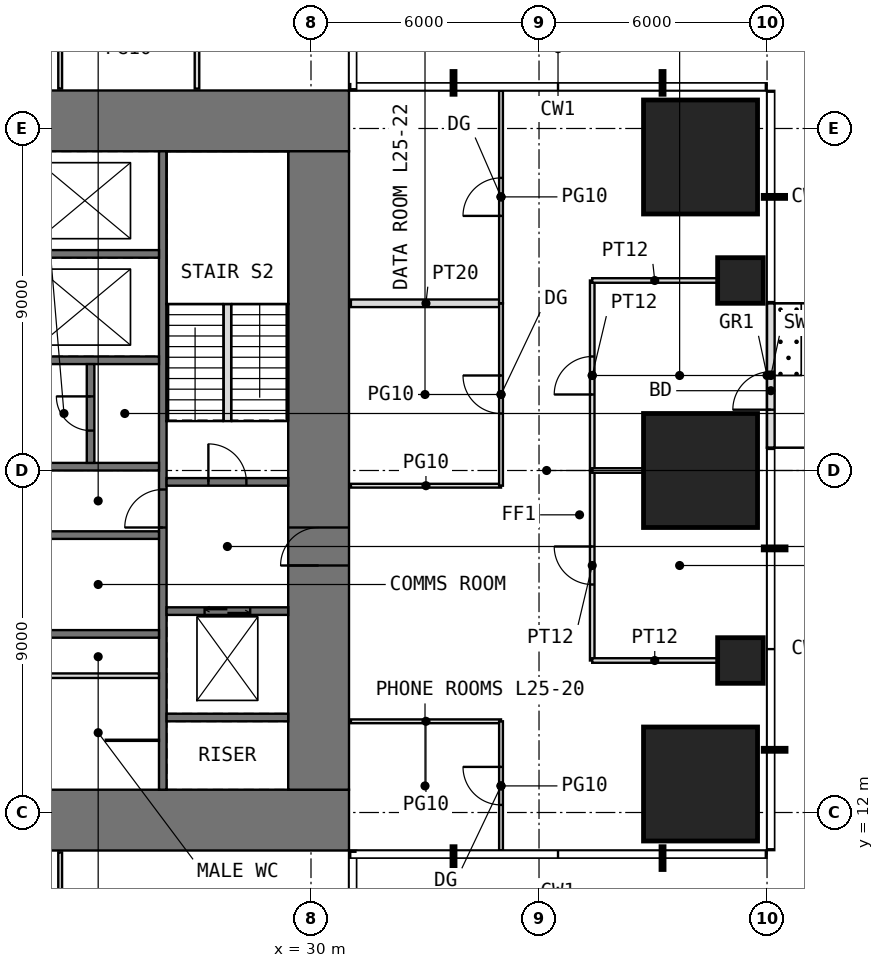
"""IFC4 building model, lengths in metres.
Left out: names, types, materials, properties, quantities, classifications, styles, units other than length and angle.
Written with IfcOpenShell. Run it as: python <this file> out.ifc"""

import sys

from ifc_helpers import new_model, si_unit, direction, frame, frame_2d, origin, origin_2d, place, context, subcontext, project, spatial, rectangle, extrude, element, fill, save


model = new_model("IFC4")
c1 = context("Model", 3, precision=1e-05, world=origin(), true_north=direction((0.0, 1.0)))
c2 = subcontext(c1, "Body", "Model", "MODEL_VIEW")
j1 = project(units=[si_unit("LENGTHUNIT", "METRE"), si_unit("PLANEANGLEUNIT", "RADIAN")], contexts=[c1])
p1 = place(None, origin())
s1 = spatial("IfcSite", under=j1, at=p1, CompositionType="ELEMENT")
p2 = place(p1, origin())
s2 = spatial("IfcBuilding", under=s1, at=p2, CompositionType="ELEMENT")
p3 = place(p2, frame((0.0, 0.0, 108.5)))
s3 = spatial("IfcBuildingStorey", under=s2, at=p3, CompositionType="ELEMENT", Elevation=108.5)
p4 = place(p3, frame((40.25, 12.75, 0.0), z_axis=(0.0, 0.0, 1.0), x_axis=(1.0, 0.0, 0.0)))
e1 = element("IfcColumn", 1, at=p4, inside=s3, PredefinedType="COLUMN", context=c2, shape_type="SweptSolid", body=[
    extrude(rectangle(XDim=3.0, YDim=3.0, at=origin_2d()), origin(), (0.0, 0.0, 1.0), 4.0),
])
p5 = place(p3, frame((41.3, 16.0, 0.0), z_axis=(0.0, 0.0, 1.0), x_axis=(1.0, 0.0, 0.0)))
e2 = element("IfcColumn", 2, at=p5, inside=s3, PredefinedType="COLUMN", context=c2, shape_type="SweptSolid", body=[
    extrude(rectangle(XDim=1.2, YDim=1.2, at=origin_2d()), origin(), (0.0, 0.0, 1.0), 4.0),
])
p6 = place(p3, frame((40.25, 21.0, 0.0), z_axis=(0.0, 0.0, 1.0), x_axis=(1.0, 0.0, 0.0)))
e3 = element("IfcColumn", 3, at=p6, inside=s3, PredefinedType="COLUMN", context=c2, shape_type="SweptSolid", body=[
    extrude(rectangle(XDim=3.0, YDim=3.0, at=origin_2d()), origin(), (0.0, 0.0, 1.0), 4.0),
])
p7 = place(p3, frame((41.3, 26.0, 0.0), z_axis=(0.0, 0.0, 1.0), x_axis=(1.0, 0.0, 0.0)))
e4 = element("IfcColumn", 4, at=p7, inside=s3, PredefinedType="COLUMN", context=c2, shape_type="SweptSolid", body=[
    extrude(rectangle(XDim=1.2, YDim=1.2, at=origin_2d()), origin(), (0.0, 0.0, 1.0), 4.0),
])
p8 = place(p3, frame((40.25, 29.25, 0.0), z_axis=(0.0, 0.0, 1.0), x_axis=(1.0, 0.0, 0.0)))
e5 = element("IfcColumn", 5, at=p8, inside=s3, PredefinedType="COLUMN", context=c2, shape_type="SweptSolid", body=[
    extrude(rectangle(XDim=3.0, YDim=3.0, at=origin_2d()), origin(), (0.0, 0.0, 1.0), 4.0),
])
p9 = place(p3, frame((42.1, 21.6, 0.0), z_axis=(0.0, 0.0, 1.0), x_axis=(0.0, 1.0, 0.0)))
e6 = element("IfcWall", 6, at=p9, inside=s3, PredefinedType="USERDEFINED", context=c2, shape_type="SweptSolid", body=[
    extrude(rectangle(XDim=3.8, YDim=0.2, at=frame_2d((1.9, 0.0))), origin(), (0.0, 0.0, 1.0), 3.75),
])
p10 = place(p9, frame((1.0, 0.0, 0.0)))
e7 = element("IfcOpeningElement", 7, at=p10, cuts=e6, PredefinedType="OPENING", context=c2, shape_type="SweptSolid", body=[
    extrude(rectangle(XDim=1.0, YDim=2.4, at=frame_2d((0.5, 1.2))), frame((0.0, 0.11, 0.0), z_axis=(0.0, -1.0, 0.0), x_axis=(1.0, 0.0, 0.0)), (0.0, 0.0, 1.0), 0.22),
])
p11 = place(p3, frame((11.0, 11.8, -0.05), z_axis=(0.0, 0.0, 1.0), x_axis=(1.0, 0.0, 0.0)))
e8 = element("IfcWall", 8, at=p11, inside=s3, PredefinedType="SHEAR", context=c2, shape_type="SweptSolid", body=[
    extrude(rectangle(XDim=20.0, YDim=1.6, at=frame_2d((10.0, 0.0))), origin(), (0.0, 0.0, 1.0), 4.0),
])
p12 = place(p11, frame((9.0, 0.0, 0.05)))
e9 = element("IfcOpeningElement", 9, at=p12, cuts=e8, PredefinedType="OPENING", context=c2, shape_type="SweptSolid", body=[
    extrude(rectangle(XDim=2.0, YDim=2.2, at=frame_2d((1.0, 1.1))), frame((0.0, 0.81, 0.0), z_axis=(0.0, -1.0, 0.0), x_axis=(1.0, 0.0, 0.0)), (0.0, 0.0, 1.0), 1.62),
])
p13 = place(p3, frame((11.0, 30.2, -0.05), z_axis=(0.0, 0.0, 1.0), x_axis=(1.0, 0.0, 0.0)))
e10 = element("IfcWall", 10, at=p13, inside=s3, PredefinedType="SHEAR", context=c2, shape_type="SweptSolid", body=[
    extrude(rectangle(XDim=20.0, YDim=1.6, at=frame_2d((10.0, 0.0))), origin(), (0.0, 0.0, 1.0), 4.0),
])
p14 = place(p13, frame((9.0, 0.0, 0.05)))
e11 = element("IfcOpeningElement", 11, at=p14, cuts=e10, PredefinedType="OPENING", context=c2, shape_type="SweptSolid", body=[
    extrude(rectangle(XDim=2.0, YDim=2.2, at=frame_2d((1.0, 1.1))), frame((0.0, 0.81, 0.0), z_axis=(0.0, -1.0, 0.0), x_axis=(1.0, 0.0, 0.0)), (0.0, 0.0, 1.0), 1.62),
])
p15 = place(p3, frame((30.2, 12.6, -0.05), z_axis=(0.0, 0.0, 1.0), x_axis=(0.0, 1.0, 0.0)))
e12 = element("IfcWall", 12, at=p15, inside=s3, PredefinedType="SHEAR", context=c2, shape_type="SweptSolid", body=[
    extrude(rectangle(XDim=16.8, YDim=1.6, at=frame_2d((8.4, 0.0))), origin(), (0.0, 0.0, 1.0), 4.0),
])
p16 = place(p15, frame((5.9, 0.0, 0.05)))
e13 = element("IfcOpeningElement", 13, at=p16, cuts=e12, PredefinedType="OPENING", context=c2, shape_type="SweptSolid", body=[
    extrude(rectangle(XDim=1.0, YDim=2.2, at=frame_2d((0.5, 1.1))), frame((0.0, 0.81, 0.0), z_axis=(0.0, -1.0, 0.0), x_axis=(1.0, 0.0, 0.0)), (0.0, 0.0, 1.0), 1.62),
])
p17 = place(p3, frame((26.1, 12.6, -0.05), z_axis=(0.0, 0.0, 1.0), x_axis=(0.0, 1.0, 0.0)))
e14 = element("IfcWall", 14, at=p17, inside=s3, PredefinedType="SHEAR", context=c2, shape_type="SweptSolid", body=[
    extrude(rectangle(XDim=16.8, YDim=0.2, at=frame_2d((8.4, 0.0))), origin(), (0.0, 0.0, 1.0), 4.0),
])
p18 = place(p17, frame((6.9, 0.0, 0.05)))
e15 = element("IfcOpeningElement", 15, at=p18, cuts=e14, PredefinedType="OPENING", context=c2, shape_type="SweptSolid", body=[
    extrude(rectangle(XDim=1.0, YDim=2.2, at=frame_2d((0.5, 1.1))), frame((0.0, 0.11, 0.0), z_axis=(0.0, -1.0, 0.0), x_axis=(1.0, 0.0, 0.0)), (0.0, 0.0, 1.0), 0.22),
])
for number, where, z_axis, x_axis in (
    (16, (22.8, 16.7, -0.05), (0.0, 0.0, 1.0), (1.0, 0.0, 0.0)),
    (17, (22.8, 19.3, -0.05), (0.0, 0.0, 1.0), (1.0, 0.0, 0.0)),
    (18, (22.8, 21.1, -0.05), (0.0, 0.0, 1.0), (1.0, 0.0, 0.0)),
    (19, (22.8, 23.9, -0.05), (0.0, 0.0, 1.0), (1.0, 0.0, 0.0)),
    (20, (22.8, 26.7, -0.05), (0.0, 0.0, 1.0), (1.0, 0.0, 0.0)),
    (21, (26.2, 14.5, -0.05), (0.0, 0.0, 1.0), (1.0, 0.0, 0.0)),
):
    element("IfcWall", number, at=place(p3, frame(where, z_axis=z_axis, x_axis=x_axis)), inside=s3, PredefinedType="SHEAR", context=c2, shape_type="SweptSolid", body=[
        extrude(rectangle(XDim=3.2, YDim=0.2, at=frame_2d((1.6, 0.0))), origin(), (0.0, 0.0, 1.0), 4.0),
    ])
p19 = place(p3, frame((26.2, 17.3, -0.05), z_axis=(0.0, 0.0, 1.0), x_axis=(1.0, 0.0, 0.0)))
e22 = element("IfcWall", 22, at=p19, inside=s3, PredefinedType="SHEAR", context=c2, shape_type="SweptSolid", body=[
    extrude(rectangle(XDim=3.2, YDim=0.2, at=frame_2d((1.6, 0.0))), origin(), (0.0, 0.0, 1.0), 4.0),
])
p20 = place(p19, frame((1.0, 0.0, 0.05)))
e23 = element("IfcOpeningElement", 23, at=p20, cuts=e22, PredefinedType="OPENING", context=c2, shape_type="SweptSolid", body=[
    extrude(rectangle(XDim=1.2, YDim=2.2, at=frame_2d((0.6, 1.1))), frame((0.0, 0.11, 0.0), z_axis=(0.0, -1.0, 0.0), x_axis=(1.0, 0.0, 0.0)), (0.0, 0.0, 1.0), 0.22),
])
p21 = place(p3, frame((26.2, 20.7, -0.05), z_axis=(0.0, 0.0, 1.0), x_axis=(1.0, 0.0, 0.0)))
e24 = element("IfcWall", 24, at=p21, inside=s3, PredefinedType="SHEAR", context=c2, shape_type="SweptSolid", body=[
    extrude(rectangle(XDim=3.2, YDim=0.2, at=frame_2d((1.6, 0.0))), origin(), (0.0, 0.0, 1.0), 4.0),
])
p22 = place(p21, frame((1.1, 0.0, 0.05)))
e25 = element("IfcOpeningElement", 25, at=p22, cuts=e24, PredefinedType="OPENING", context=c2, shape_type="SweptSolid", body=[
    extrude(rectangle(XDim=1.0, YDim=2.2, at=frame_2d((0.5, 1.1))), frame((0.0, 0.11, 0.0), z_axis=(0.0, -1.0, 0.0), x_axis=(1.0, 0.0, 0.0)), (0.0, 0.0, 1.0), 0.22),
])
p23 = place(p3, frame((22.8, 15.6, 0.0), z_axis=(0.0, 0.0, 1.0), x_axis=(1.0, 0.0, 0.0)))
e26 = element("IfcWall", 26, at=p23, inside=s3, PredefinedType="PARTITIONING", context=c2, shape_type="SweptSolid", body=[
    extrude(rectangle(XDim=3.2, YDim=0.12, at=frame_2d((1.6, 0.0))), origin(), (0.0, 0.0, 1.0), 3.75),
])
p24 = place(p3, frame((24.6, 13.9, 0.0), z_axis=(0.0, 0.0, 1.0), x_axis=(1.0, 0.0, 0.0)))
e27 = element("IfcWall", 27, at=p24, inside=s3, PredefinedType="PARTITIONING", context=c2, shape_type="SweptSolid", body=[
    extrude(rectangle(XDim=1.4, YDim=0.03, at=frame_2d((0.7, 0.0))), origin(), (0.0, 0.0, 1.0), 3.75),
])
p25 = place(p3, frame((24.2, 21.2, -0.05), z_axis=(0.0, 0.0, 1.0), x_axis=(0.0, 1.0, 0.0)))
e28 = element("IfcWall", 28, at=p25, inside=s3, PredefinedType="SHEAR", context=c2, shape_type="SweptSolid", body=[
    extrude(rectangle(XDim=2.6, YDim=0.2, at=frame_2d((1.3, 0.0))), origin(), (0.0, 0.0, 1.0), 4.0),
])
p26 = place(p25, frame((0.85, 0.0, 0.05)))
e29 = element("IfcOpeningElement", 29, at=p26, cuts=e28, PredefinedType="OPENING", context=c2, shape_type="SweptSolid", body=[
    extrude(rectangle(XDim=0.9, YDim=2.2, at=frame_2d((0.45, 1.1))), frame((0.0, 0.11, 0.0), z_axis=(0.0, -1.0, 0.0), x_axis=(1.0, 0.0, 0.0)), (0.0, 0.0, 1.0), 0.22),
])
for number, where, z_axis, x_axis in (
    (30, (23.4, 7.0, 0.0), (0.0, 0.0, 1.0), (0.0, 1.0, 0.0)),
    (31, (23.4, 31.05, 0.0), (0.0, 0.0, 1.0), (0.0, 1.0, 0.0)),
):
    element("IfcWall", number, at=place(p3, frame(where, z_axis=z_axis, x_axis=x_axis)), inside=s3, PredefinedType="PARTITIONING", context=c2, shape_type="SweptSolid", body=[
        extrude(rectangle(XDim=3.95, YDim=0.1, at=frame_2d((1.975, 0.0))), origin(), (0.0, 0.0, 1.0), 3.75),
    ])
p27 = place(p3, frame((27.0, 31.05, 0.0), z_axis=(0.0, 0.0, 1.0), x_axis=(0.0, 1.0, 0.0)))
e32 = element("IfcWall", 32, at=p27, inside=s3, PredefinedType="PARTITIONING", context=c2, shape_type="SweptSolid", body=[
    extrude(rectangle(XDim=3.45, YDim=0.12, at=frame_2d((1.725, 0.0))), origin(), (0.0, 0.0, 1.0), 3.75),
])
for number, where, z_axis, x_axis in (
    (33, (31.05, 14.4, 0.0), (0.0, 0.0, 1.0), (1.0, 0.0, 0.0)),
    (34, (31.05, 20.6, 0.0), (0.0, 0.0, 1.0), (1.0, 0.0, 0.0)),
):
    element("IfcWall", number, at=place(p3, frame(where, z_axis=z_axis, x_axis=x_axis)), inside=s3, PredefinedType="PARTITIONING", context=c2, shape_type="SweptSolid", body=[
        extrude(rectangle(XDim=3.95, YDim=0.1, at=frame_2d((1.975, 0.0))), origin(), (0.0, 0.0, 1.0), 3.75),
    ])
p28 = place(p3, frame((31.05, 25.4, 0.0), z_axis=(0.0, 0.0, 1.0), x_axis=(1.0, 0.0, 0.0)))
e35 = element("IfcWall", 35, at=p28, inside=s3, PredefinedType="PARTITIONING", context=c2, shape_type="SweptSolid", body=[
    extrude(rectangle(XDim=3.95, YDim=0.2, at=frame_2d((1.975, 0.0))), origin(), (0.0, 0.0, 1.0), 3.75),
])
p29 = place(p3, frame((35.0, 11.0, 0.0), z_axis=(0.0, 0.0, 1.0), x_axis=(0.0, 1.0, 0.0)))
e36 = element("IfcWall", 36, at=p29, inside=s3, PredefinedType="PARTITIONING", context=c2, shape_type="SweptSolid", body=[
    extrude(rectangle(XDim=3.4, YDim=0.1, at=frame_2d((1.7, 0.0))), origin(), (0.0, 0.0, 1.0), 3.75),
])
p30 = place(p29, frame((1.2, 0.0, 0.0)))
e37 = element("IfcOpeningElement", 37, at=p30, cuts=e36, PredefinedType="OPENING", context=c2, shape_type="SweptSolid", body=[
    extrude(rectangle(XDim=1.0, YDim=2.4, at=frame_2d((0.5, 1.2))), frame((0.0, 0.06, 0.0), z_axis=(0.0, -1.0, 0.0), x_axis=(1.0, 0.0, 0.0)), (0.0, 0.0, 1.0), 0.12),
])
p31 = place(p3, frame((35.0, 20.6, 0.0), z_axis=(0.0, 0.0, 1.0), x_axis=(0.0, 1.0, 0.0)))
e38 = element("IfcWall", 38, at=p31, inside=s3, PredefinedType="PARTITIONING", context=c2, shape_type="SweptSolid", body=[
    extrude(rectangle(XDim=4.8, YDim=0.1, at=frame_2d((2.4, 0.0))), origin(), (0.0, 0.0, 1.0), 3.75),
])
p32 = place(p31, frame((1.9, 0.0, 0.0)))
e39 = element("IfcOpeningElement", 39, at=p32, cuts=e38, PredefinedType="OPENING", context=c2, shape_type="SweptSolid", body=[
    extrude(rectangle(XDim=1.0, YDim=2.4, at=frame_2d((0.5, 1.2))), frame((0.0, 0.06, 0.0), z_axis=(0.0, -1.0, 0.0), x_axis=(1.0, 0.0, 0.0)), (0.0, 0.0, 1.0), 0.12),
])
p33 = place(p3, frame((35.0, 25.4, 0.0), z_axis=(0.0, 0.0, 1.0), x_axis=(0.0, 1.0, 0.0)))
e40 = element("IfcWall", 40, at=p33, inside=s3, PredefinedType="PARTITIONING", context=c2, shape_type="SweptSolid", body=[
    extrude(rectangle(XDim=5.6, YDim=0.1, at=frame_2d((2.8, 0.0))), origin(), (0.0, 0.0, 1.0), 3.75),
])
p34 = place(p33, frame((2.3, 0.0, 0.0)))
e41 = element("IfcOpeningElement", 41, at=p34, cuts=e40, PredefinedType="OPENING", context=c2, shape_type="SweptSolid", body=[
    extrude(rectangle(XDim=1.0, YDim=2.4, at=frame_2d((0.5, 1.2))), frame((0.0, 0.06, 0.0), z_axis=(0.0, -1.0, 0.0), x_axis=(1.0, 0.0, 0.0)), (0.0, 0.0, 1.0), 0.12),
])
p35 = place(p3, frame((37.4, 16.0, 0.0), z_axis=(0.0, 0.0, 1.0), x_axis=(0.0, 1.0, 0.0)))
e42 = element("IfcWall", 42, at=p35, inside=s3, PredefinedType="PARTITIONING", context=c2, shape_type="SweptSolid", body=[
    extrude(rectangle(XDim=5.0, YDim=0.12, at=frame_2d((2.5, 0.0))), origin(), (0.0, 0.0, 1.0), 3.75),
])
p36 = place(p35, frame((2.0, 0.0, 0.0)))
e43 = element("IfcOpeningElement", 43, at=p36, cuts=e42, PredefinedType="OPENING", context=c2, shape_type="SweptSolid", body=[
    extrude(rectangle(XDim=1.0, YDim=2.2, at=frame_2d((0.5, 1.1))), frame((0.0, 0.07, 0.0), z_axis=(0.0, -1.0, 0.0), x_axis=(1.0, 0.0, 0.0)), (0.0, 0.0, 1.0), 0.14),
])
p37 = place(p3, frame((37.4, 16.0, 0.0), z_axis=(0.0, 0.0, 1.0), x_axis=(1.0, 0.0, 0.0)))
e44 = element("IfcWall", 44, at=p37, inside=s3, PredefinedType="PARTITIONING", context=c2, shape_type="SweptSolid", body=[
    extrude(rectangle(XDim=3.29, YDim=0.12, at=frame_2d((1.645, 0.0))), origin(), (0.0, 0.0, 1.0), 3.75),
])
p38 = place(p3, frame((37.4, 21.0, 0.0), z_axis=(0.0, 0.0, 1.0), x_axis=(0.0, 1.0, 0.0)))
e45 = element("IfcWall", 45, at=p38, inside=s3, PredefinedType="PARTITIONING", context=c2, shape_type="SweptSolid", body=[
    extrude(rectangle(XDim=5.0, YDim=0.12, at=frame_2d((2.5, 0.0))), origin(), (0.0, 0.0, 1.0), 3.75),
])
p39 = place(p38, frame((2.0, 0.0, 0.0)))
e46 = element("IfcOpeningElement", 46, at=p39, cuts=e45, PredefinedType="OPENING", context=c2, shape_type="SweptSolid", body=[
    extrude(rectangle(XDim=1.0, YDim=2.2, at=frame_2d((0.5, 1.1))), frame((0.0, 0.07, 0.0), z_axis=(0.0, -1.0, 0.0), x_axis=(1.0, 0.0, 0.0)), (0.0, 0.0, 1.0), 0.14),
])
p40 = place(p3, frame((37.4, 21.0, 0.0), z_axis=(0.0, 0.0, 1.0), x_axis=(1.0, 0.0, 0.0)))
e47 = element("IfcWall", 47, at=p40, inside=s3, PredefinedType="PARTITIONING", context=c2, shape_type="SweptSolid", body=[
    extrude(rectangle(XDim=1.34, YDim=0.12, at=frame_2d((0.67, 0.0))), origin(), (0.0, 0.0, 1.0), 3.75),
])
p41 = place(p3, frame((37.4, 26.0, 0.0), z_axis=(0.0, 0.0, 1.0), x_axis=(1.0, 0.0, 0.0)))
e48 = element("IfcWall", 48, at=p41, inside=s3, PredefinedType="PARTITIONING", context=c2, shape_type="SweptSolid", body=[
    extrude(rectangle(XDim=3.29, YDim=0.12, at=frame_2d((1.645, 0.0))), origin(), (0.0, 0.0, 1.0), 3.75),
])
p42 = place(p3, frame((27.8, 22.3, 0.0), z_axis=(0.0, 0.0, 1.0), x_axis=(0.0, 1.0, 0.0)))
e49 = element("IfcWall", 49, at=p42, inside=s3, PredefinedType="PARTITIONING", context=c2, shape_type="SweptSolid", body=[
    extrude(rectangle(XDim=3.08, YDim=0.2, at=frame_2d((1.54, 0.0))), origin(), (0.0, 0.0, 1.0), 4.0),
])
p43 = place(p10, origin())
e50 = element("IfcDoor", 50, at=p43, inside=s3, OperationType="SINGLE_SWING_LEFT", PredefinedType="DOOR", context=c2, shape_type="SweptSolid", body=[
    extrude(rectangle(XDim=1.0, YDim=2.4, at=frame_2d((0.5, 1.2))), frame((0.0, 0.025, 0.0), z_axis=(0.0, -1.0, 0.0), x_axis=(1.0, 0.0, 0.0)), (0.0, 0.0, 1.0), 0.05),
])
fill(e7, e50)
p44 = place(p16, origin())
e51 = element("IfcDoor", 51, at=p44, inside=s3, OperationType="SINGLE_SWING_LEFT", PredefinedType="DOOR", context=c2, shape_type="SweptSolid", body=[
    extrude(rectangle(XDim=1.0, YDim=2.2, at=frame_2d((0.5, 1.1))), frame((0.0, 0.025, 0.0), z_axis=(0.0, -1.0, 0.0), x_axis=(1.0, 0.0, 0.0)), (0.0, 0.0, 1.0), 0.05),
])
fill(e13, e51)
p45 = place(p22, origin())
e52 = element("IfcDoor", 52, at=p45, inside=s3, OperationType="SINGLE_SWING_LEFT", PredefinedType="DOOR", context=c2, shape_type="SweptSolid", body=[
    extrude(rectangle(XDim=1.0, YDim=2.2, at=frame_2d((0.5, 1.1))), frame((0.0, 0.025, 0.0), z_axis=(0.0, -1.0, 0.0), x_axis=(1.0, 0.0, 0.0)), (0.0, 0.0, 1.0), 0.05),
])
fill(e25, e52)
p46 = place(p18, origin())
e53 = element("IfcDoor", 53, at=p46, inside=s3, OperationType="SINGLE_SWING_LEFT", PredefinedType="DOOR", context=c2, shape_type="SweptSolid", body=[
    extrude(rectangle(XDim=1.0, YDim=2.2, at=frame_2d((0.5, 1.1))), frame((0.0, 0.025, 0.0), z_axis=(0.0, -1.0, 0.0), x_axis=(1.0, 0.0, 0.0)), (0.0, 0.0, 1.0), 0.05),
])
fill(e15, e53)
p47 = place(p26, origin())
e54 = element("IfcDoor", 54, at=p47, inside=s3, OperationType="SINGLE_SWING_RIGHT", PredefinedType="DOOR", context=c2, shape_type="SweptSolid", body=[
    extrude(rectangle(XDim=0.9, YDim=2.2, at=frame_2d((0.45, 1.1))), frame((0.0, 0.025, 0.0), z_axis=(0.0, -1.0, 0.0), x_axis=(1.0, 0.0, 0.0)), (0.0, 0.0, 1.0), 0.05),
])
fill(e29, e54)
p48 = place(p30, origin())
e55 = element("IfcDoor", 55, at=p48, inside=s3, OperationType="SINGLE_SWING_RIGHT", PredefinedType="DOOR", context=c2, shape_type="SweptSolid", body=[
    extrude(rectangle(XDim=1.0, YDim=2.4, at=frame_2d((0.5, 1.2))), frame((0.0, 0.025, 0.0), z_axis=(0.0, -1.0, 0.0), x_axis=(1.0, 0.0, 0.0)), (0.0, 0.0, 1.0), 0.05),
])
fill(e37, e55)
p49 = place(p32, origin())
e56 = element("IfcDoor", 56, at=p49, inside=s3, OperationType="SINGLE_SWING_RIGHT", PredefinedType="DOOR", context=c2, shape_type="SweptSolid", body=[
    extrude(rectangle(XDim=1.0, YDim=2.4, at=frame_2d((0.5, 1.2))), frame((0.0, 0.025, 0.0), z_axis=(0.0, -1.0, 0.0), x_axis=(1.0, 0.0, 0.0)), (0.0, 0.0, 1.0), 0.05),
])
fill(e39, e56)
p50 = place(p34, origin())
e57 = element("IfcDoor", 57, at=p50, inside=s3, OperationType="SINGLE_SWING_LEFT", PredefinedType="DOOR", context=c2, shape_type="SweptSolid", body=[
    extrude(rectangle(XDim=1.0, YDim=2.4, at=frame_2d((0.5, 1.2))), frame((0.0, 0.025, 0.0), z_axis=(0.0, -1.0, 0.0), x_axis=(1.0, 0.0, 0.0)), (0.0, 0.0, 1.0), 0.05),
])
fill(e41, e57)
p51 = place(p36, origin())
e58 = element("IfcDoor", 58, at=p51, inside=s3, OperationType="SINGLE_SWING_RIGHT", PredefinedType="DOOR", context=c2, shape_type="SweptSolid", body=[
    extrude(rectangle(XDim=1.0, YDim=2.2, at=frame_2d((0.5, 1.1))), frame((0.0, 0.025, 0.0), z_axis=(0.0, -1.0, 0.0), x_axis=(1.0, 0.0, 0.0)), (0.0, 0.0, 1.0), 0.05),
])
fill(e43, e58)
p52 = place(p39, origin())
e59 = element("IfcDoor", 59, at=p52, inside=s3, OperationType="SINGLE_SWING_LEFT", PredefinedType="DOOR", context=c2, shape_type="SweptSolid", body=[
    extrude(rectangle(XDim=1.0, YDim=2.2, at=frame_2d((0.5, 1.1))), frame((0.0, 0.025, 0.0), z_axis=(0.0, -1.0, 0.0), x_axis=(1.0, 0.0, 0.0)), (0.0, 0.0, 1.0), 0.05),
])
fill(e46, e59)
p53 = place(p20, origin())
e60 = element("IfcDoor", 60, at=p53, inside=s3, OperationType="DOUBLE_DOOR_SLIDING", PredefinedType="DOOR", context=c2, shape_type="SweptSolid", body=[
    extrude(rectangle(XDim=1.2, YDim=2.2, at=frame_2d((0.6, 1.1))), frame((0.0, 0.025, 0.0), z_axis=(0.0, -1.0, 0.0), x_axis=(1.0, 0.0, 0.0)), (0.0, 0.0, 1.0), 0.05),
])
fill(e23, e60)
save(model, sys.argv[1])
